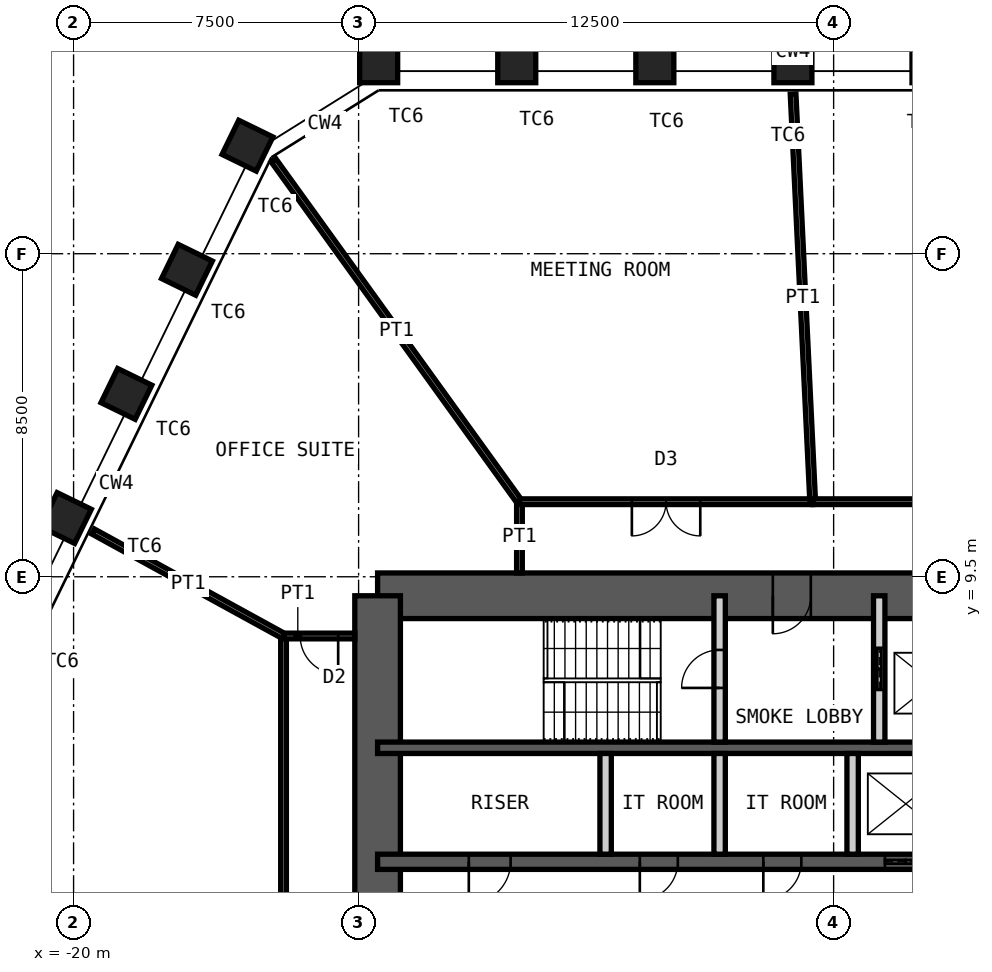
"""IFC4 building model, lengths in metres.
Left out: names, types, materials, properties, quantities, classifications, styles, units other than length and angle.
Written with IfcOpenShell. Run it as: python <this file> out.ifc"""

import sys

from ifc_helpers import new_model, si_unit, direction, frame, frame_2d, origin, origin_2d, place, context, subcontext, project, spatial, rectangle, hollow_rectangle, extrude, element, fill, save


model = new_model("IFC4")
c1 = context("Model", 3, precision=1e-05, world=origin(), true_north=direction((0.0, 1.0)))
c2 = subcontext(c1, "Body", "Model", "MODEL_VIEW")
j1 = project(units=[si_unit("LENGTHUNIT", "METRE"), si_unit("PLANEANGLEUNIT", "RADIAN")], contexts=[c1])
p1 = place(None, origin())
s1 = spatial("IfcSite", under=j1, at=p1, CompositionType="ELEMENT")
p2 = place(p1, origin())
s2 = spatial("IfcBuilding", under=s1, at=p2, CompositionType="ELEMENT")
p3 = place(p2, frame((0.0, 0.0, 222.4)))
s3 = spatial("IfcBuildingStorey", under=s2, at=p3, CompositionType="ELEMENT", Elevation=222.4)
for number, where, z_axis, x_axis in (
    (1, (-11.972, 23.0, 0.0), (0.0, 0.0, 1.0), (-1.0, 0.0, 0.0)),
    (2, (-8.338, 23.0, 0.0), (0.0, 0.0, 1.0), (-1.0, 0.0, 0.0)),
    (3, (-4.705, 23.0, 0.0), (0.0, 0.0, 1.0), (-1.0, 0.0, 0.0)),
    (4, (-1.071, 23.0, 0.0), (0.0, 0.0, 1.0), (-1.0, 0.0, 0.0)),
    (5, (-20.203, 11.045, 0.0), (0.0, 0.0, 1.0), (-0.438, -0.899, 0.0)),
    (6, (-18.61, 14.311, 0.0), (0.0, 0.0, 1.0), (-0.438, -0.899, 0.0)),
    (7, (-17.017, 17.577, 0.0), (0.0, 0.0, 1.0), (-0.438, -0.899, 0.0)),
    (8, (-15.424, 20.843, 0.0), (0.0, 0.0, 1.0), (-0.438, -0.899, 0.0)),
):
    element("IfcColumn", number, at=place(p3, frame(where, z_axis=z_axis, x_axis=x_axis)), inside=s3, PredefinedType="COLUMN", context=c2, shape_type="SweptSolid", body=[
        extrude(hollow_rectangle(XDim=1.0, YDim=1.0, WallThickness=0.06, at=origin_2d()), origin(), (0.0, 0.0, 1.0), 4.2),
    ])
p4 = place(p3, frame((-12.0, 9.0, 0.0), z_axis=(0.0, 0.0, 1.0), x_axis=(1.0, 0.0, 0.0)))
e9 = element("IfcWall", 9, at=p4, inside=s3, PredefinedType="SHEAR", context=c2, shape_type="SweptSolid", body=[
    extrude(rectangle(XDim=24.0, YDim=1.2, at=frame_2d((12.0, 0.0))), origin(), (0.0, 0.0, 1.0), 4.2),
])
p5 = place(p4, frame((10.4, 0.0, 0.0)))
e10 = element("IfcOpeningElement", 10, at=p5, cuts=e9, PredefinedType="OPENING", context=c2, shape_type="SweptSolid", body=[
    extrude(rectangle(XDim=1.0, YDim=2.1, at=frame_2d((0.5, 1.05))), frame((0.0, 0.61, 0.0), z_axis=(0.0, -1.0, 0.0), x_axis=(1.0, 0.0, 0.0)), (0.0, 0.0, 1.0), 1.22),
])
p6 = place(p4, frame((17.6, 0.0, 0.0)))
e11 = element("IfcOpeningElement", 11, at=p6, cuts=e9, PredefinedType="OPENING", context=c2, shape_type="SweptSolid", body=[
    extrude(rectangle(XDim=0.9, YDim=2.1, at=frame_2d((0.45, 1.05))), frame((0.0, 0.61, 0.0), z_axis=(0.0, -1.0, 0.0), x_axis=(1.0, 0.0, 0.0)), (0.0, 0.0, 1.0), 1.22),
])
p7 = place(p4, frame((21.9, 0.0, 0.0)))
e12 = element("IfcOpeningElement", 12, at=p7, cuts=e9, PredefinedType="OPENING", context=c2, shape_type="SweptSolid", body=[
    extrude(rectangle(XDim=0.9, YDim=2.1, at=frame_2d((0.45, 1.05))), frame((0.0, 0.61, 0.0), z_axis=(0.0, -1.0, 0.0), x_axis=(1.0, 0.0, 0.0)), (0.0, 0.0, 1.0), 1.22),
])
p8 = place(p3, frame((-12.0, -9.0, 0.0), z_axis=(0.0, 0.0, 1.0), x_axis=(0.0, 1.0, 0.0)))
e13 = element("IfcWall", 13, at=p8, inside=s3, PredefinedType="SHEAR", context=c2, shape_type="SweptSolid", body=[
    extrude(rectangle(XDim=18.0, YDim=1.2, at=frame_2d((9.0, 0.0))), origin(), (0.0, 0.0, 1.0), 4.2),
])
p9 = place(p8, frame((8.1, 0.0, 0.0)))
e14 = element("IfcOpeningElement", 14, at=p9, cuts=e13, PredefinedType="OPENING", context=c2, shape_type="SweptSolid", body=[
    extrude(rectangle(XDim=1.8, YDim=2.1, at=frame_2d((0.9, 1.05))), frame((0.0, 0.61, 0.0), z_axis=(0.0, -1.0, 0.0), x_axis=(1.0, 0.0, 0.0)), (0.0, 0.0, 1.0), 1.22),
])
p10 = place(p3, frame((-12.0, 5.0, 0.0), z_axis=(0.0, 0.0, 1.0), x_axis=(1.0, 0.0, 0.0)))
e15 = element("IfcWall", 15, at=p10, inside=s3, PredefinedType="SHEAR", context=c2, shape_type="SweptSolid", body=[
    extrude(rectangle(XDim=24.0, YDim=0.3, at=frame_2d((12.0, 0.0))), origin(), (0.0, 0.0, 1.0), 4.2),
])
p11 = place(p3, frame((-12.0, 2.0, 0.0), z_axis=(0.0, 0.0, 1.0), x_axis=(1.0, 0.0, 0.0)))
e16 = element("IfcWall", 16, at=p11, inside=s3, PredefinedType="SHEAR", context=c2, shape_type="SweptSolid", body=[
    extrude(rectangle(XDim=24.0, YDim=0.4, at=frame_2d((12.0, 0.0))), origin(), (0.0, 0.0, 1.0), 4.2),
])
p12 = place(p11, frame((2.4, 0.0, 0.0)))
e17 = element("IfcOpeningElement", 17, at=p12, cuts=e16, PredefinedType="OPENING", context=c2, shape_type="SweptSolid", body=[
    extrude(rectangle(XDim=1.1, YDim=2.1, at=frame_2d((0.55, 1.05))), frame((0.0, 0.21, 0.0), z_axis=(0.0, -1.0, 0.0), x_axis=(1.0, 0.0, 0.0)), (0.0, 0.0, 1.0), 0.42),
])
p13 = place(p11, frame((22.0, 0.0, 0.0)))
e18 = element("IfcOpeningElement", 18, at=p13, cuts=e16, PredefinedType="OPENING", context=c2, shape_type="SweptSolid", body=[
    extrude(rectangle(XDim=1.1, YDim=2.1, at=frame_2d((0.55, 1.05))), frame((0.0, 0.21, 0.0), z_axis=(0.0, -1.0, 0.0), x_axis=(1.0, 0.0, 0.0)), (0.0, 0.0, 1.0), 0.42),
])
p14 = place(p11, frame((10.15, 0.0, 0.0)))
e19 = element("IfcOpeningElement", 19, at=p14, cuts=e16, PredefinedType="OPENING", context=c2, shape_type="SweptSolid", body=[
    extrude(rectangle(XDim=1.0, YDim=2.1, at=frame_2d((0.5, 1.05))), frame((0.0, 0.21, 0.0), z_axis=(0.0, -1.0, 0.0), x_axis=(1.0, 0.0, 0.0)), (0.0, 0.0, 1.0), 0.42),
])
p15 = place(p11, frame((6.9, 0.0, 0.0)))
e20 = element("IfcOpeningElement", 20, at=p15, cuts=e16, PredefinedType="OPENING", context=c2, shape_type="SweptSolid", body=[
    extrude(rectangle(XDim=1.0, YDim=2.1, at=frame_2d((0.5, 1.05))), frame((0.0, 0.21, 0.0), z_axis=(0.0, -1.0, 0.0), x_axis=(1.0, 0.0, 0.0)), (0.0, 0.0, 1.0), 0.42),
])
p16 = place(p11, frame((13.35, 0.0, 0.0)))
e21 = element("IfcOpeningElement", 21, at=p16, cuts=e16, PredefinedType="OPENING", context=c2, shape_type="SweptSolid", body=[
    extrude(rectangle(XDim=1.1, YDim=2.4, at=frame_2d((0.55, 1.2))), frame((0.0, 0.21, 0.0), z_axis=(0.0, -1.0, 0.0), x_axis=(1.0, 0.0, 0.0)), (0.0, 0.0, 1.0), 0.42),
])
p17 = place(p11, frame((16.15, 0.0, 0.0)))
e22 = element("IfcOpeningElement", 22, at=p17, cuts=e16, PredefinedType="OPENING", context=c2, shape_type="SweptSolid", body=[
    extrude(rectangle(XDim=1.1, YDim=2.4, at=frame_2d((0.55, 1.2))), frame((0.0, 0.21, 0.0), z_axis=(0.0, -1.0, 0.0), x_axis=(1.0, 0.0, 0.0)), (0.0, 0.0, 1.0), 0.42),
])
p18 = place(p11, frame((18.95, 0.0, 0.0)))
e23 = element("IfcOpeningElement", 23, at=p18, cuts=e16, PredefinedType="OPENING", context=c2, shape_type="SweptSolid", body=[
    extrude(rectangle(XDim=1.1, YDim=2.4, at=frame_2d((0.55, 1.2))), frame((0.0, 0.21, 0.0), z_axis=(0.0, -1.0, 0.0), x_axis=(1.0, 0.0, 0.0)), (0.0, 0.0, 1.0), 0.42),
])
p19 = place(p3, frame((-3.0, 5.15, 0.0), z_axis=(0.0, 0.0, 1.0), x_axis=(0.0, 1.0, 0.0)))
e24 = element("IfcWall", 24, at=p19, inside=s3, PredefinedType="PARTITIONING", context=c2, shape_type="SweptSolid", body=[
    extrude(rectangle(XDim=3.85, YDim=0.3, at=frame_2d((1.925, 0.0))), origin(), (0.0, 0.0, 1.0), 3.98),
])
p20 = place(p19, frame((1.425, 0.0, 0.0)))
e25 = element("IfcOpeningElement", 25, at=p20, cuts=e24, PredefinedType="OPENING", context=c2, shape_type="SweptSolid", body=[
    extrude(rectangle(XDim=1.0, YDim=2.1, at=frame_2d((0.5, 1.05))), frame((0.0, 0.16, 0.0), z_axis=(0.0, -1.0, 0.0), x_axis=(1.0, 0.0, 0.0)), (0.0, 0.0, 1.0), 0.32),
])
p21 = place(p3, frame((1.2, 5.15, 0.0), z_axis=(0.0, 0.0, 1.0), x_axis=(0.0, 1.0, 0.0)))
e26 = element("IfcWall", 26, at=p21, inside=s3, PredefinedType="PARTITIONING", context=c2, shape_type="SweptSolid", body=[
    extrude(rectangle(XDim=3.85, YDim=0.3, at=frame_2d((1.925, 0.0))), origin(), (0.0, 0.0, 1.0), 3.98),
])
p22 = place(p21, frame((1.375, 0.0, 0.0)))
e27 = element("IfcOpeningElement", 27, at=p22, cuts=e26, PredefinedType="OPENING", context=c2, shape_type="SweptSolid", body=[
    extrude(rectangle(XDim=1.1, YDim=2.4, at=frame_2d((0.55, 1.2))), frame((0.0, 0.16, 0.0), z_axis=(0.0, -1.0, 0.0), x_axis=(1.0, 0.0, 0.0)), (0.0, 0.0, 1.0), 0.32),
])
for number, where, z_axis, x_axis in (
    (28, (-6.0, 2.2, 0.0), (0.0, 0.0, 1.0), (0.0, 1.0, 0.0)),
    (29, (-3.0, 2.2, 0.0), (0.0, 0.0, 1.0), (0.0, 1.0, 0.0)),
    (30, (0.5, 2.2, 0.0), (0.0, 0.0, 1.0), (0.0, 1.0, 0.0)),
):
    element("IfcWall", number, at=place(p3, frame(where, z_axis=z_axis, x_axis=x_axis)), inside=s3, PredefinedType="PARTITIONING", context=c2, shape_type="SweptSolid", body=[
        extrude(rectangle(XDim=2.65, YDim=0.3, at=frame_2d((1.325, 0.0))), origin(), (0.0, 0.0, 1.0), 3.98),
    ])
p23 = place(p3, frame((-14.475, -9.311, 0.0), z_axis=(0.0, 0.0, 1.0), x_axis=(0.0, 1.0, 0.0)))
e31 = element("IfcWall", 31, at=p23, inside=s3, PredefinedType="PARTITIONING", context=c2, shape_type="SweptSolid", body=[
    extrude(rectangle(XDim=17.252, YDim=0.15, at=frame_2d((8.626, 0.0))), origin(), (0.0, 0.0, 1.0), 4.03),
])
p24 = place(p23, frame((7.726, 0.0, 0.0)))
e32 = element("IfcOpeningElement", 32, at=p24, cuts=e31, PredefinedType="OPENING", context=c2, shape_type="SweptSolid", body=[
    extrude(rectangle(XDim=1.8, YDim=2.4, at=frame_2d((0.9, 1.2))), frame((0.0, 0.085, 0.0), z_axis=(0.0, -1.0, 0.0), x_axis=(1.0, 0.0, 0.0)), (0.0, 0.0, 1.0), 0.17),
])
p25 = place(p3, frame((-19.486, 10.69, 0.0), z_axis=(0.0, 0.0, 1.0), x_axis=(0.876724089264, -0.480993629172, 0.0)))
e33 = element("IfcWall", 33, at=p25, inside=s3, PredefinedType="PARTITIONING", context=c2, shape_type="SweptSolid", body=[
    extrude(rectangle(XDim=5.715, YDim=0.15, at=frame_2d((2.858, 0.0))), origin(), (0.0, 0.0, 1.0), 3.43),
])
p26 = place(p3, frame((-14.475, 7.941, 0.0), z_axis=(0.0, 0.0, 1.0), x_axis=(1.0, 0.0, 0.0)))
e34 = element("IfcWall", 34, at=p26, inside=s3, PredefinedType="PARTITIONING", context=c2, shape_type="SweptSolid", body=[
    extrude(rectangle(XDim=1.875, YDim=0.15, at=frame_2d((0.938, 0.0))), origin(), (0.0, 0.0, 1.0), 4.03),
])
p27 = place(p26, frame((0.438, 0.0, 0.0)))
e35 = element("IfcOpeningElement", 35, at=p27, cuts=e34, PredefinedType="OPENING", context=c2, shape_type="SweptSolid", body=[
    extrude(rectangle(XDim=1.0, YDim=2.4, at=frame_2d((0.5, 1.2))), frame((0.0, 0.085, 0.0), z_axis=(0.0, -1.0, 0.0), x_axis=(1.0, 0.0, 0.0)), (0.0, 0.0, 1.0), 0.17),
])
p28 = place(p3, frame((-8.267, 9.6, 0.0), z_axis=(0.0, 0.0, 1.0), x_axis=(0.0, 1.0, 0.0)))
e36 = element("IfcWall", 36, at=p28, inside=s3, PredefinedType="PARTITIONING", context=c2, shape_type="SweptSolid", body=[
    extrude(rectangle(XDim=1.875, YDim=0.15, at=frame_2d((0.938, 0.0))), origin(), (0.0, 0.0, 1.0), 4.03),
])
p29 = place(p3, frame((-14.737, 20.455, 0.0), z_axis=(0.0, 0.0, 1.0), x_axis=(0.584547025688, -0.811359830629, 0.0)))
e37 = element("IfcWall", 37, at=p29, inside=s3, PredefinedType="PARTITIONING", context=c2, shape_type="SweptSolid", body=[
    extrude(rectangle(XDim=11.068, YDim=0.15, at=frame_2d((5.534, 0.0))), origin(), (0.0, 0.0, 1.0), 2.93),
])
p30 = place(p3, frame((-8.267, 11.475, 0.0), z_axis=(0.0, 0.0, 1.0), x_axis=(1.0, 0.0, 0.0)))
e38 = element("IfcWall", 38, at=p30, inside=s3, PredefinedType="PARTITIONING", context=c2, shape_type="SweptSolid", body=[
    extrude(rectangle(XDim=7.716, YDim=0.15, at=frame_2d((3.858, 0.0))), origin(), (0.0, 0.0, 1.0), 4.03),
])
p31 = place(p30, frame((2.958, 0.0, 0.0)))
e39 = element("IfcOpeningElement", 39, at=p31, cuts=e38, PredefinedType="OPENING", context=c2, shape_type="SweptSolid", body=[
    extrude(rectangle(XDim=1.8, YDim=2.4, at=frame_2d((0.9, 1.2))), frame((0.0, 0.085, 0.0), z_axis=(0.0, -1.0, 0.0), x_axis=(1.0, 0.0, 0.0)), (0.0, 0.0, 1.0), 0.17),
])
p32 = place(p3, frame((-1.067, 22.2, 0.0), z_axis=(0.0, 0.0, 1.0), x_axis=(0.047998335863, -0.998847415652, 0.0)))
e40 = element("IfcWall", 40, at=p32, inside=s3, PredefinedType="PARTITIONING", context=c2, shape_type="SweptSolid", body=[
    extrude(rectangle(XDim=10.738, YDim=0.15, at=frame_2d((5.369, 0.0))), origin(), (0.0, 0.0, 1.0), 3.43),
])
p33 = place(p3, frame((-0.551, 11.475, 0.0), z_axis=(0.0, 0.0, 1.0), x_axis=(1.0, 0.0, 0.0)))
e41 = element("IfcWall", 41, at=p33, inside=s3, PredefinedType="PARTITIONING", context=c2, shape_type="SweptSolid", body=[
    extrude(rectangle(XDim=15.026, YDim=0.15, at=frame_2d((7.513, 0.0))), origin(), (0.0, 0.0, 1.0), 4.03),
])
p34 = place(p33, frame((6.613, 0.0, 0.0)))
e42 = element("IfcOpeningElement", 42, at=p34, cuts=e41, PredefinedType="OPENING", context=c2, shape_type="SweptSolid", body=[
    extrude(rectangle(XDim=1.8, YDim=2.4, at=frame_2d((0.9, 1.2))), frame((0.0, 0.085, 0.0), z_axis=(0.0, -1.0, 0.0), x_axis=(1.0, 0.0, 0.0)), (0.0, 0.0, 1.0), 0.17),
])
p35 = place(p5, origin())
e43 = element("IfcDoor", 43, at=p35, inside=s3, OperationType="SINGLE_SWING_LEFT", PredefinedType="DOOR", context=c2, shape_type="SweptSolid", body=[
    extrude(rectangle(XDim=1.0, YDim=2.1, at=frame_2d((0.5, 1.05))), frame((0.0, 0.025, 0.0), z_axis=(0.0, -1.0, 0.0), x_axis=(1.0, 0.0, 0.0)), (0.0, 0.0, 1.0), 0.05),
])
fill(e10, e43)
p36 = place(p20, origin())
e44 = element("IfcDoor", 44, at=p36, inside=s3, OperationType="SINGLE_SWING_RIGHT", PredefinedType="DOOR", context=c2, shape_type="SweptSolid", body=[
    extrude(rectangle(XDim=1.0, YDim=2.1, at=frame_2d((0.5, 1.05))), frame((0.0, 0.025, 0.0), z_axis=(0.0, -1.0, 0.0), x_axis=(1.0, 0.0, 0.0)), (0.0, 0.0, 1.0), 0.05),
])
fill(e25, e44)
p37 = place(p12, origin())
e45 = element("IfcDoor", 45, at=p37, inside=s3, OperationType="SINGLE_SWING_LEFT", PredefinedType="DOOR", context=c2, shape_type="SweptSolid", body=[
    extrude(rectangle(XDim=1.1, YDim=2.1, at=frame_2d((0.55, 1.05))), frame((0.0, 0.025, 0.0), z_axis=(0.0, -1.0, 0.0), x_axis=(1.0, 0.0, 0.0)), (0.0, 0.0, 1.0), 0.05),
])
fill(e17, e45)
p38 = place(p14, origin())
e46 = element("IfcDoor", 46, at=p38, inside=s3, OperationType="SINGLE_SWING_LEFT", PredefinedType="DOOR", context=c2, shape_type="SweptSolid", body=[
    extrude(rectangle(XDim=1.0, YDim=2.1, at=frame_2d((0.5, 1.05))), frame((0.0, 0.025, 0.0), z_axis=(0.0, -1.0, 0.0), x_axis=(1.0, 0.0, 0.0)), (0.0, 0.0, 1.0), 0.05),
])
fill(e19, e46)
p39 = place(p22, origin())
e47 = element("IfcDoor", 47, at=p39, inside=s3, OperationType="DOUBLE_DOOR_SLIDING", PredefinedType="DOOR", context=c2, shape_type="SweptSolid", body=[
    extrude(rectangle(XDim=1.1, YDim=2.4, at=frame_2d((0.55, 1.2))), frame((0.0, 0.025, 0.0), z_axis=(0.0, -1.0, 0.0), x_axis=(1.0, 0.0, 0.0)), (0.0, 0.0, 1.0), 0.05),
])
fill(e27, e47)
p40 = place(p15, origin())
e48 = element("IfcDoor", 48, at=p40, inside=s3, OperationType="SINGLE_SWING_LEFT", PredefinedType="DOOR", context=c2, shape_type="SweptSolid", body=[
    extrude(rectangle(XDim=1.0, YDim=2.1, at=frame_2d((0.5, 1.05))), frame((0.0, 0.025, 0.0), z_axis=(0.0, -1.0, 0.0), x_axis=(1.0, 0.0, 0.0)), (0.0, 0.0, 1.0), 0.05),
])
fill(e20, e48)
p41 = place(p16, origin())
e49 = element("IfcDoor", 49, at=p41, inside=s3, OperationType="DOUBLE_DOOR_SLIDING", PredefinedType="DOOR", context=c2, shape_type="SweptSolid", body=[
    extrude(rectangle(XDim=1.1, YDim=2.4, at=frame_2d((0.55, 1.2))), frame((0.0, 0.025, 0.0), z_axis=(0.0, -1.0, 0.0), x_axis=(1.0, 0.0, 0.0)), (0.0, 0.0, 1.0), 0.05),
])
fill(e21, e49)
p42 = place(p27, origin())
e50 = element("IfcDoor", 50, at=p42, inside=s3, OperationType="SINGLE_SWING_RIGHT", PredefinedType="DOOR", context=c2, shape_type="SweptSolid", body=[
    extrude(rectangle(XDim=1.0, YDim=2.4, at=frame_2d((0.5, 1.2))), frame((0.0, 0.025, 0.0), z_axis=(0.0, -1.0, 0.0), x_axis=(1.0, 0.0, 0.0)), (0.0, 0.0, 1.0), 0.05),
])
fill(e35, e50)
p43 = place(p31, origin())
e51 = element("IfcDoor", 51, at=p43, inside=s3, OperationType="DOUBLE_DOOR_DOUBLE_SWING", PredefinedType="DOOR", context=c2, shape_type="SweptSolid", body=[
    extrude(rectangle(XDim=1.8, YDim=2.4, at=frame_2d((0.9, 1.2))), frame((0.0, 0.025, 0.0), z_axis=(0.0, -1.0, 0.0), x_axis=(1.0, 0.0, 0.0)), (0.0, 0.0, 1.0), 0.05),
])
fill(e39, e51)
save(model, sys.argv[1])
